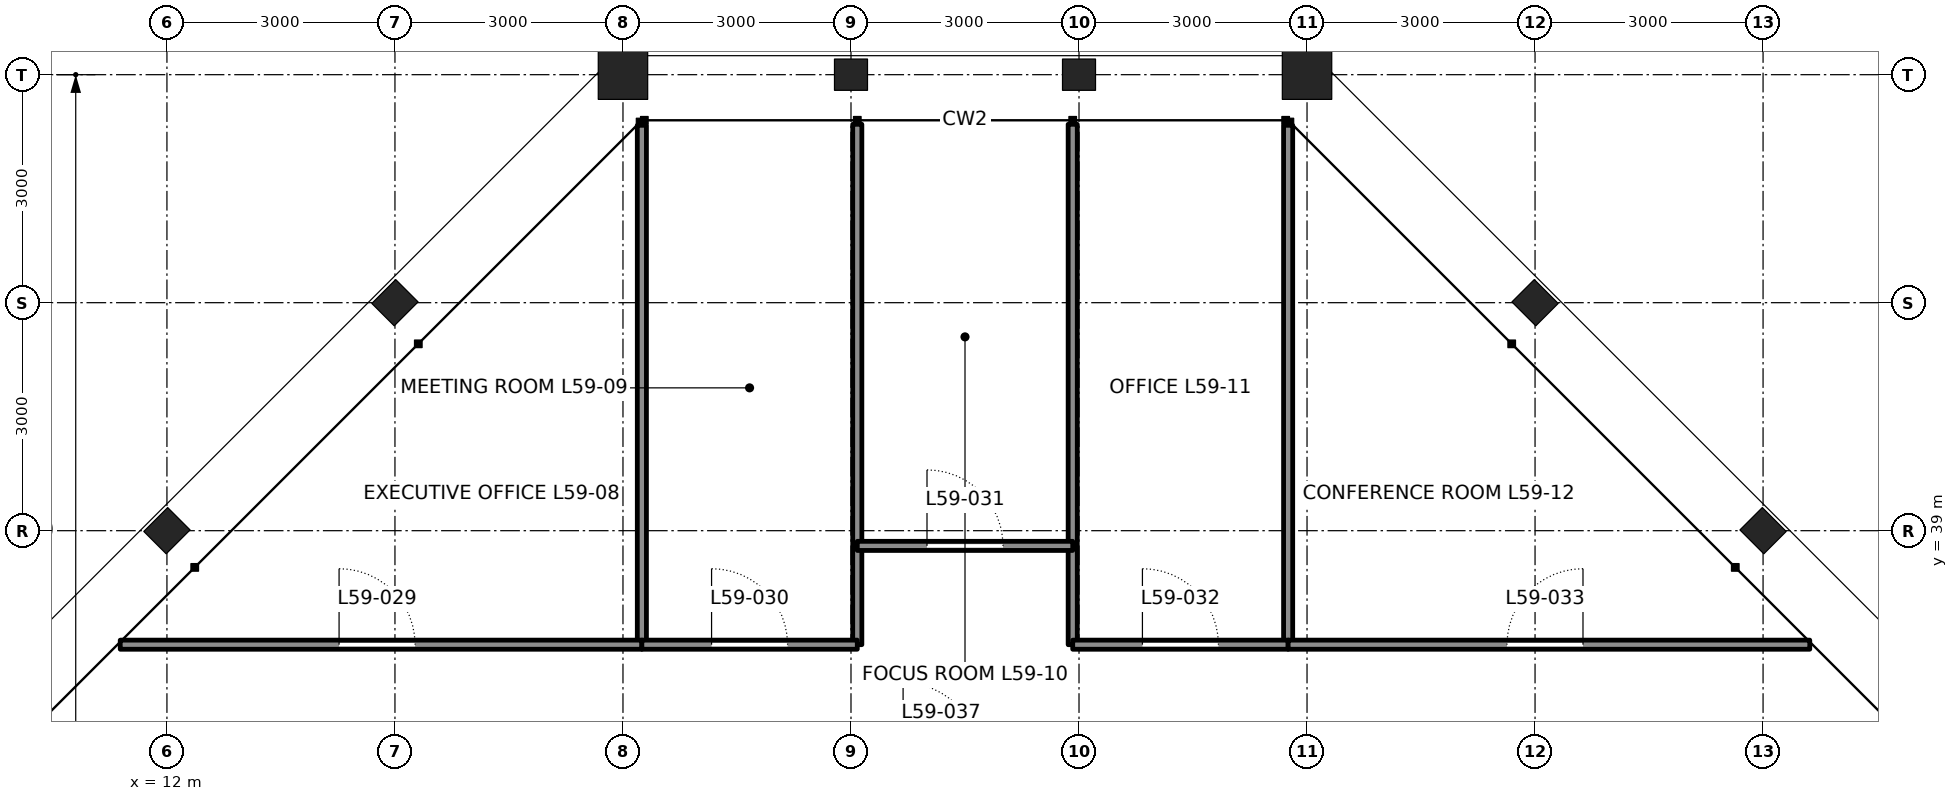
"""IFC4 building model, lengths in metres.
Left out: names, types, materials, properties, quantities, classifications, styles, units other than length and angle.
Written with IfcOpenShell. Run it as: python <this file> out.ifc"""

import sys

from ifc_helpers import new_model, si_unit, direction, frame, frame_2d, origin, origin_2d, place, context, subcontext, project, spatial, rectangle, hollow_rectangle, i_section, extrude, element, fill, save


model = new_model("IFC4")
c1 = context("Model", 3, precision=1e-05, world=origin(), true_north=direction((0.0, 1.0)))
c2 = subcontext(c1, "Body", "Model", "MODEL_VIEW")
j1 = project(units=[si_unit("LENGTHUNIT", "METRE"), si_unit("PLANEANGLEUNIT", "RADIAN")], contexts=[c1])
p1 = place(None, origin())
s1 = spatial("IfcSite", under=j1, at=p1, CompositionType="ELEMENT")
p2 = place(p1, origin())
s2 = spatial("IfcBuilding", under=s1, at=p2, CompositionType="ELEMENT")
p3 = place(p2, frame((0.0, 0.0, 266.4)))
s3 = spatial("IfcBuildingStorey", under=s2, at=p3, CompositionType="ELEMENT", Elevation=266.4)
for number, where, z_axis, x_axis in (
    (1, (33.0, 39.0, 0.0), (0.0, 0.0, 1.0), (0.707, 0.707, 0.0)),
    (2, (30.0, 42.0, 0.0), (0.0, 0.0, 1.0), (0.707, 0.707, 0.0)),
):
    element("IfcColumn", number, at=place(p3, frame(where, z_axis=z_axis, x_axis=x_axis)), inside=s3, PredefinedType="COLUMN", context=c2, shape_type="SweptSolid", body=[
        extrude(i_section(OverallWidth=0.417, OverallDepth=0.445, WebThickness=0.039, FlangeThickness=0.063, at=origin_2d()), origin(), (0.0, 0.0, 1.0), 4.2),
    ])
p4 = place(p3, frame((27.0, 45.0, 0.0), z_axis=(0.0, 0.0, 1.0), x_axis=(0.0, 1.0, 0.0)))
e3 = element("IfcColumn", 3, at=p4, inside=s3, PredefinedType="COLUMN", context=c2, shape_type="SweptSolid", body=[
    extrude(hollow_rectangle(XDim=0.65, YDim=0.65, WallThickness=0.065, at=origin_2d()), origin(), (0.0, 0.0, 1.0), 4.2),
])
for number, where, z_axis, x_axis in (
    (4, (24.0, 45.0, 0.0), (0.0, 0.0, 1.0), (0.0, 1.0, 0.0)),
    (5, (21.0, 45.0, 0.0), (0.0, 0.0, 1.0), (0.0, 1.0, 0.0)),
):
    element("IfcColumn", number, at=place(p3, frame(where, z_axis=z_axis, x_axis=x_axis)), inside=s3, PredefinedType="COLUMN", context=c2, shape_type="SweptSolid", body=[
        extrude(i_section(OverallWidth=0.411, OverallDepth=0.434, WebThickness=0.036, FlangeThickness=0.057, at=origin_2d()), origin(), (0.0, 0.0, 1.0), 4.2),
    ])
p5 = place(p3, frame((18.0, 45.0, 0.0), z_axis=(0.0, 0.0, 1.0), x_axis=(0.0, 1.0, 0.0)))
e6 = element("IfcColumn", 6, at=p5, inside=s3, PredefinedType="COLUMN", context=c2, shape_type="SweptSolid", body=[
    extrude(hollow_rectangle(XDim=0.65, YDim=0.65, WallThickness=0.065, at=origin_2d()), origin(), (0.0, 0.0, 1.0), 4.2),
])
for number, where, z_axis, x_axis in (
    (7, (15.0, 42.0, 0.0), (0.0, 0.0, 1.0), (-0.707, 0.707, 0.0)),
    (8, (12.0, 39.0, 0.0), (0.0, 0.0, 1.0), (-0.707, 0.707, 0.0)),
):
    element("IfcColumn", number, at=place(p3, frame(where, z_axis=z_axis, x_axis=x_axis)), inside=s3, PredefinedType="COLUMN", context=c2, shape_type="SweptSolid", body=[
        extrude(i_section(OverallWidth=0.417, OverallDepth=0.445, WebThickness=0.039, FlangeThickness=0.063, at=origin_2d()), origin(), (0.0, 0.0, 1.0), 4.2),
    ])
p6 = place(p3, frame((18.249, 44.334, 0.0), z_axis=(0.0, 0.0, 1.0), x_axis=(0.0, -1.0, 0.0)))
e9 = element("IfcWall", 9, at=p6, inside=s3, PredefinedType="PARTITIONING", context=c2, shape_type="SweptSolid", body=[
    extrude(rectangle(XDim=6.834, YDim=0.12, at=frame_2d((3.417, 0.0))), origin(), (0.0, 0.0, 1.0), 4.04),
])
for number, where, z_axis, x_axis in (
    (10, (21.083, 44.347, 0.0), (0.0, 0.0, 1.0), (0.0, -1.0, 0.0)),
    (11, (23.917, 44.347, 0.0), (0.0, 0.0, 1.0), (0.0, -1.0, 0.0)),
):
    element("IfcWall", number, at=place(p3, frame(where, z_axis=z_axis, x_axis=x_axis)), inside=s3, PredefinedType="PARTITIONING", context=c2, shape_type="SweptSolid", body=[
        extrude(rectangle(XDim=6.847, YDim=0.12, at=frame_2d((3.424, 0.0))), origin(), (0.0, 0.0, 1.0), 3.357),
    ])
p7 = place(p3, frame((26.751, 44.334, 0.0), z_axis=(0.0, 0.0, 1.0), x_axis=(0.0, -1.0, 0.0)))
e12 = element("IfcWall", 12, at=p7, inside=s3, PredefinedType="PARTITIONING", context=c2, shape_type="SweptSolid", body=[
    extrude(rectangle(XDim=6.834, YDim=0.12, at=frame_2d((3.417, 0.0))), origin(), (0.0, 0.0, 1.0), 4.04),
])
p8 = place(p3, frame((11.385, 37.5, 0.0), z_axis=(0.0, 0.0, 1.0), x_axis=(1.0, 0.0, 0.0)))
e13 = element("IfcWall", 13, at=p8, inside=s3, PredefinedType="PARTITIONING", context=c2, shape_type="SweptSolid", body=[
    extrude(rectangle(XDim=6.863, YDim=0.12, at=frame_2d((3.432, 0.0))), origin(), (0.0, 0.0, 1.0), 4.04),
])
p9 = place(p8, frame((2.879, 0.0, 0.0)))
e14 = element("IfcOpeningElement", 14, at=p9, cuts=e13, PredefinedType="OPENING", context=c2, shape_type="SweptSolid", body=[
    extrude(rectangle(XDim=1.0, YDim=2.4, at=frame_2d((0.5, 1.2))), frame((0.0, 0.07, 0.0), z_axis=(0.0, -1.0, 0.0), x_axis=(1.0, 0.0, 0.0)), (0.0, 0.0, 1.0), 0.14),
])
p10 = place(p3, frame((18.249, 37.5, 0.0), z_axis=(0.0, 0.0, 1.0), x_axis=(1.0, 0.0, 0.0)))
e15 = element("IfcWall", 15, at=p10, inside=s3, PredefinedType="PARTITIONING", context=c2, shape_type="SweptSolid", body=[
    extrude(rectangle(XDim=2.834, YDim=0.12, at=frame_2d((1.417, 0.0))), origin(), (0.0, 0.0, 1.0), 4.04),
])
p11 = place(p10, frame((0.917, 0.0, 0.0)))
e16 = element("IfcOpeningElement", 16, at=p11, cuts=e15, PredefinedType="OPENING", context=c2, shape_type="SweptSolid", body=[
    extrude(rectangle(XDim=1.0, YDim=2.4, at=frame_2d((0.5, 1.2))), frame((0.0, 0.07, 0.0), z_axis=(0.0, -1.0, 0.0), x_axis=(1.0, 0.0, 0.0)), (0.0, 0.0, 1.0), 0.14),
])
p12 = place(p3, frame((21.083, 38.8, 0.0), z_axis=(0.0, 0.0, 1.0), x_axis=(1.0, 0.0, 0.0)))
e17 = element("IfcWall", 17, at=p12, inside=s3, PredefinedType="PARTITIONING", context=c2, shape_type="SweptSolid", body=[
    extrude(rectangle(XDim=2.834, YDim=0.12, at=frame_2d((1.417, 0.0))), origin(), (0.0, 0.0, 1.0), 4.04),
])
p13 = place(p12, frame((0.917, 0.0, 0.0)))
e18 = element("IfcOpeningElement", 18, at=p13, cuts=e17, PredefinedType="OPENING", context=c2, shape_type="SweptSolid", body=[
    extrude(rectangle(XDim=1.0, YDim=2.4, at=frame_2d((0.5, 1.2))), frame((0.0, 0.07, 0.0), z_axis=(0.0, -1.0, 0.0), x_axis=(1.0, 0.0, 0.0)), (0.0, 0.0, 1.0), 0.14),
])
p14 = place(p3, frame((23.917, 37.5, 0.0), z_axis=(0.0, 0.0, 1.0), x_axis=(1.0, 0.0, 0.0)))
e19 = element("IfcWall", 19, at=p14, inside=s3, PredefinedType="PARTITIONING", context=c2, shape_type="SweptSolid", body=[
    extrude(rectangle(XDim=2.834, YDim=0.12, at=frame_2d((1.417, 0.0))), origin(), (0.0, 0.0, 1.0), 4.04),
])
p15 = place(p14, frame((0.917, 0.0, 0.0)))
e20 = element("IfcOpeningElement", 20, at=p15, cuts=e19, PredefinedType="OPENING", context=c2, shape_type="SweptSolid", body=[
    extrude(rectangle(XDim=1.0, YDim=2.4, at=frame_2d((0.5, 1.2))), frame((0.0, 0.07, 0.0), z_axis=(0.0, -1.0, 0.0), x_axis=(1.0, 0.0, 0.0)), (0.0, 0.0, 1.0), 0.14),
])
p16 = place(p3, frame((26.751, 37.5, 0.0), z_axis=(0.0, 0.0, 1.0), x_axis=(1.0, 0.0, 0.0)))
e21 = element("IfcWall", 21, at=p16, inside=s3, PredefinedType="PARTITIONING", context=c2, shape_type="SweptSolid", body=[
    extrude(rectangle(XDim=6.863, YDim=0.12, at=frame_2d((3.432, 0.0))), origin(), (0.0, 0.0, 1.0), 4.04),
])
p17 = place(p16, frame((2.879, 0.0, 0.0)))
e22 = element("IfcOpeningElement", 22, at=p17, cuts=e21, PredefinedType="OPENING", context=c2, shape_type="SweptSolid", body=[
    extrude(rectangle(XDim=1.0, YDim=2.4, at=frame_2d((0.5, 1.2))), frame((0.0, 0.07, 0.0), z_axis=(0.0, -1.0, 0.0), x_axis=(1.0, 0.0, 0.0)), (0.0, 0.0, 1.0), 0.14),
])
p18 = place(p9, origin())
e23 = element("IfcDoor", 23, at=p18, inside=s3, OperationType="SINGLE_SWING_LEFT", PredefinedType="DOOR", context=c2, shape_type="SweptSolid", body=[
    extrude(rectangle(XDim=1.0, YDim=2.4, at=frame_2d((0.5, 1.2))), frame((0.0, 0.025, 0.0), z_axis=(0.0, -1.0, 0.0), x_axis=(1.0, 0.0, 0.0)), (0.0, 0.0, 1.0), 0.05),
])
fill(e14, e23)
p19 = place(p11, origin())
e24 = element("IfcDoor", 24, at=p19, inside=s3, OperationType="SINGLE_SWING_LEFT", PredefinedType="DOOR", context=c2, shape_type="SweptSolid", body=[
    extrude(rectangle(XDim=1.0, YDim=2.4, at=frame_2d((0.5, 1.2))), frame((0.0, 0.025, 0.0), z_axis=(0.0, -1.0, 0.0), x_axis=(1.0, 0.0, 0.0)), (0.0, 0.0, 1.0), 0.05),
])
fill(e16, e24)
p20 = place(p13, origin())
e25 = element("IfcDoor", 25, at=p20, inside=s3, OperationType="SINGLE_SWING_LEFT", PredefinedType="DOOR", context=c2, shape_type="SweptSolid", body=[
    extrude(rectangle(XDim=1.0, YDim=2.4, at=frame_2d((0.5, 1.2))), frame((0.0, 0.025, 0.0), z_axis=(0.0, -1.0, 0.0), x_axis=(1.0, 0.0, 0.0)), (0.0, 0.0, 1.0), 0.05),
])
fill(e18, e25)
p21 = place(p15, origin())
e26 = element("IfcDoor", 26, at=p21, inside=s3, OperationType="SINGLE_SWING_LEFT", PredefinedType="DOOR", context=c2, shape_type="SweptSolid", body=[
    extrude(rectangle(XDim=1.0, YDim=2.4, at=frame_2d((0.5, 1.2))), frame((0.0, 0.025, 0.0), z_axis=(0.0, -1.0, 0.0), x_axis=(1.0, 0.0, 0.0)), (0.0, 0.0, 1.0), 0.05),
])
fill(e20, e26)
p22 = place(p17, origin())
e27 = element("IfcDoor", 27, at=p22, inside=s3, OperationType="SINGLE_SWING_RIGHT", PredefinedType="DOOR", context=c2, shape_type="SweptSolid", body=[
    extrude(rectangle(XDim=1.0, YDim=2.4, at=frame_2d((0.5, 1.2))), frame((0.0, 0.025, 0.0), z_axis=(0.0, -1.0, 0.0), x_axis=(1.0, 0.0, 0.0)), (0.0, 0.0, 1.0), 0.05),
])
fill(e22, e27)
save(model, sys.argv[1])
